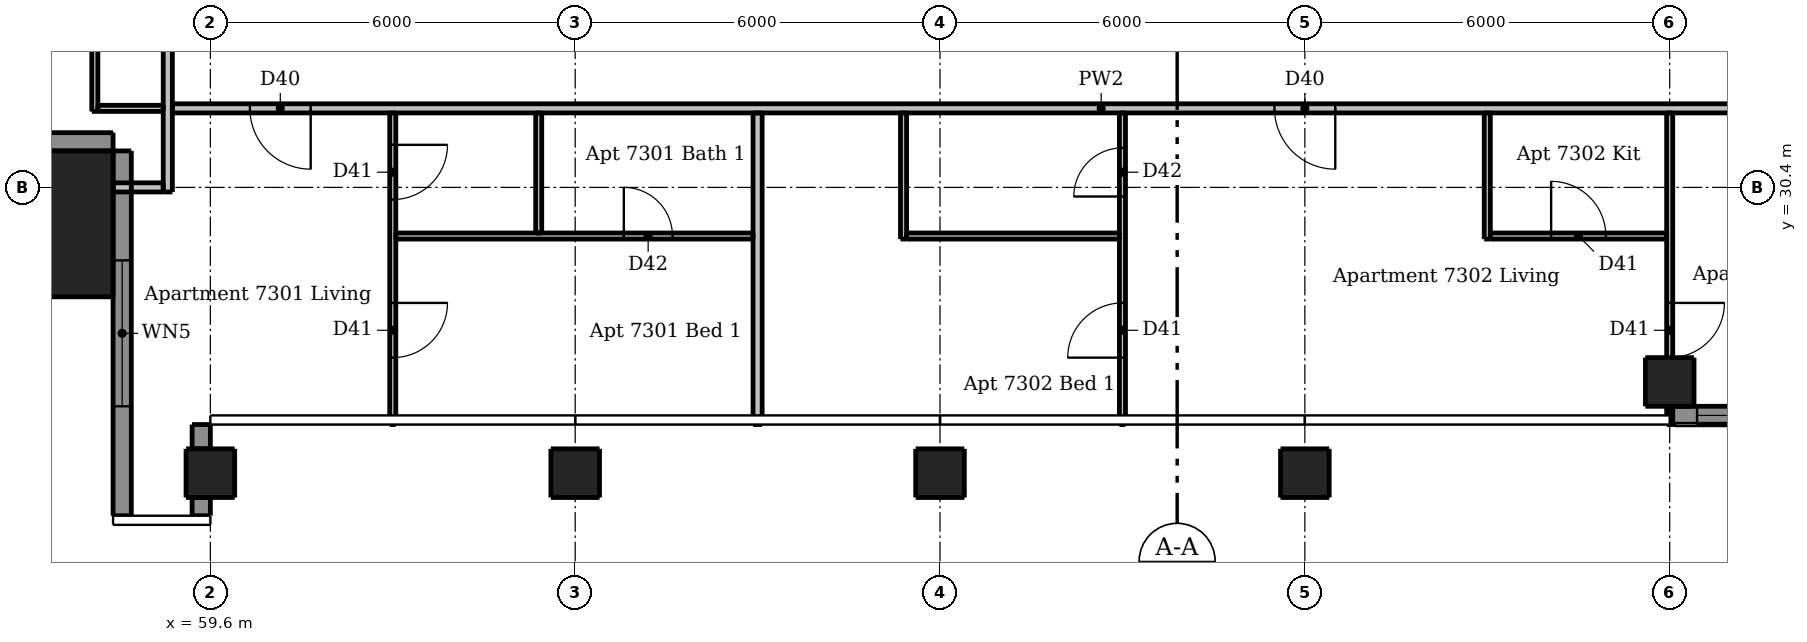
"""IFC4 building model, lengths in metres.
Left out: names, types, materials, properties, quantities, classifications, styles, units other than length and angle.
Written with IfcOpenShell. Run it as: python <this file> out.ifc"""

import sys

from ifc_helpers import new_model, si_unit, direction, frame, frame_2d, origin, origin_2d, place, context, subcontext, project, spatial, rectangle, extrude, element, fill, save


model = new_model("IFC4")
c1 = context("Model", 3, precision=1e-05, world=origin(), true_north=direction((0.0, 1.0)))
c2 = subcontext(c1, "Body", "Model", "MODEL_VIEW")
j1 = project(units=[si_unit("LENGTHUNIT", "METRE"), si_unit("PLANEANGLEUNIT", "RADIAN")], contexts=[c1])
p1 = place(None, origin())
s1 = spatial("IfcSite", under=j1, at=p1, CompositionType="ELEMENT")
p2 = place(p1, origin())
s2 = spatial("IfcBuilding", under=s1, at=p2, CompositionType="ELEMENT")
p3 = place(p2, frame((0.0, 0.0, 271.9)))
s3 = spatial("IfcBuildingStorey", under=s2, at=p3, CompositionType="ELEMENT", Elevation=271.9)
for number, where, z_axis, x_axis in (
    (1, (59.6, 25.7, 0.0), (0.0, 0.0, 1.0), (1.0, 0.0, 0.0)),
    (2, (65.6, 25.7, 0.0), (0.0, 0.0, 1.0), (1.0, 0.0, 0.0)),
    (3, (71.6, 25.7, 0.0), (0.0, 0.0, 1.0), (1.0, 0.0, 0.0)),
    (4, (77.6, 25.7, 0.0), (0.0, 0.0, 1.0), (1.0, 0.0, 0.0)),
    (5, (83.6, 27.2, 0.0), (0.0, 0.0, 1.0), (1.0, 0.0, 0.0)),
):
    element("IfcColumn", number, at=place(p3, frame(where, z_axis=z_axis, x_axis=x_axis)), inside=s3, PredefinedType="COLUMN", context=c2, shape_type="SweptSolid", body=[
        extrude(rectangle(XDim=0.8, YDim=0.8, at=origin_2d()), origin(), (0.0, 0.0, 1.0), 3.05),
    ])
p4 = place(p3, frame((56.8, 29.8, 0.0), z_axis=(0.0, 0.0, 1.0), x_axis=(1.0, 0.0, 0.0)))
e6 = element("IfcColumn", 6, at=p4, inside=s3, PredefinedType="COLUMN", context=c2, shape_type="SweptSolid", body=[
    extrude(rectangle(XDim=2.4, YDim=2.4, at=origin_2d()), origin(), (0.0, 0.0, 1.0), 3.3),
])
p5 = place(p3, frame((59.45, 25.0, 0.0), z_axis=(0.0, 0.0, 1.0), x_axis=(0.0, 1.0, 0.0)))
e7 = element("IfcWall", 7, at=p5, inside=s3, PredefinedType="SOLIDWALL", context=c2, shape_type="SweptSolid", body=[
    extrude(rectangle(XDim=0.3, YDim=0.3, at=frame_2d((0.15, 0.0))), origin(), (0.0, 0.0, 1.0), 3.05),
])
p6 = place(p3, frame((59.45, 26.1, 0.0), z_axis=(0.0, 0.0, 1.0), x_axis=(0.0, 1.0, 0.0)))
e8 = element("IfcWall", 8, at=p6, inside=s3, PredefinedType="SOLIDWALL", context=c2, shape_type="SweptSolid", body=[
    extrude(rectangle(XDim=0.4, YDim=0.3, at=frame_2d((0.2, 0.0))), origin(), (0.0, 0.0, 1.0), 3.05),
])
p7 = place(p3, frame((53.0, 31.15, 0.0), z_axis=(0.0, 0.0, 1.0), x_axis=(1.0, 0.0, 0.0)))
e9 = element("IfcWall", 9, at=p7, inside=s3, PredefinedType="SOLIDWALL", context=c2, shape_type="SweptSolid", body=[
    extrude(rectangle(XDim=5.0, YDim=0.3, at=frame_2d((2.5, 0.0))), origin(), (0.0, 0.0, 1.0), 3.05),
])
p8 = place(p3, frame((58.15, 31.0, 0.0), z_axis=(0.0, 0.0, 1.0), x_axis=(0.0, -1.0, 0.0)))
e10 = element("IfcWall", 10, at=p8, inside=s3, PredefinedType="SOLIDWALL", context=c2, shape_type="SweptSolid", body=[
    extrude(rectangle(XDim=6.0, YDim=0.3, at=frame_2d((3.0, 0.0))), origin(), (0.0, 0.0, 1.0), 3.05),
])
p9 = place(p8, frame((1.8, 0.0, 0.15)))
e11 = element("IfcOpeningElement", 11, at=p9, cuts=e10, PredefinedType="OPENING", context=c2, shape_type="SweptSolid", body=[
    extrude(rectangle(XDim=2.4, YDim=2.1, at=frame_2d((1.2, 1.05))), frame((0.0, 0.16, 0.0), z_axis=(0.0, -1.0, 0.0), x_axis=(1.0, 0.0, 0.0)), (0.0, 0.0, 1.0), 0.32),
])
p10 = place(p3, frame((83.6, 26.65, 0.0), z_axis=(0.0, 0.0, 1.0), x_axis=(1.0, 0.0, 0.0)))
e12 = element("IfcWall", 12, at=p10, inside=s3, PredefinedType="SOLIDWALL", context=c2, shape_type="SweptSolid", body=[
    extrude(rectangle(XDim=5.1, YDim=0.3, at=frame_2d((2.55, 0.0))), origin(), (0.0, 0.0, 1.0), 3.05),
])
p11 = place(p10, frame((0.45, 0.0, 0.15)))
e13 = element("IfcOpeningElement", 13, at=p11, cuts=e12, PredefinedType="OPENING", context=c2, shape_type="SweptSolid", body=[
    extrude(rectangle(XDim=1.8, YDim=2.1, at=frame_2d((0.9, 1.05))), frame((0.0, 0.16, 0.0), z_axis=(0.0, -1.0, 0.0), x_axis=(1.0, 0.0, 0.0)), (0.0, 0.0, 1.0), 0.32),
])
p12 = place(p3, frame((57.7, 31.65, 0.0), z_axis=(0.0, 0.0, 1.0), x_axis=(0.0, 1.0, 0.0)))
e14 = element("IfcWall", 14, at=p12, inside=s3, PredefinedType="PARTITIONING", context=c2, shape_type="SweptSolid", body=[
    extrude(rectangle(XDim=16.675, YDim=0.1, at=frame_2d((8.337, 0.0))), origin(), (0.0, 0.0, 1.0), 3.05),
])
p13 = place(p12, frame((2.55, 0.0, 0.0)))
e15 = element("IfcOpeningElement", 15, at=p13, cuts=e14, PredefinedType="OPENING", context=c2, shape_type="SweptSolid", body=[
    extrude(rectangle(XDim=0.9, YDim=2.1, at=frame_2d((0.45, 1.05))), frame((0.0, 0.06, 0.0), z_axis=(0.0, -1.0, 0.0), x_axis=(1.0, 0.0, 0.0)), (0.0, 0.0, 1.0), 0.12),
])
p14 = place(p12, frame((8.8, 0.0, 0.0)))
e16 = element("IfcOpeningElement", 16, at=p14, cuts=e14, PredefinedType="OPENING", context=c2, shape_type="SweptSolid", body=[
    extrude(rectangle(XDim=0.9, YDim=2.1, at=frame_2d((0.45, 1.05))), frame((0.0, 0.06, 0.0), z_axis=(0.0, -1.0, 0.0), x_axis=(1.0, 0.0, 0.0)), (0.0, 0.0, 1.0), 0.12),
])
p15 = place(p12, frame((6.4, 0.0, 0.0)))
e17 = element("IfcOpeningElement", 17, at=p15, cuts=e14, PredefinedType="OPENING", context=c2, shape_type="SweptSolid", body=[
    extrude(rectangle(XDim=0.9, YDim=2.1, at=frame_2d((0.45, 1.05))), frame((0.0, 0.06, 0.0), z_axis=(0.0, -1.0, 0.0), x_axis=(1.0, 0.0, 0.0)), (0.0, 0.0, 1.0), 0.12),
])
p16 = place(p12, frame((14.5, 0.0, 0.0)))
e18 = element("IfcOpeningElement", 18, at=p16, cuts=e14, PredefinedType="OPENING", context=c2, shape_type="SweptSolid", body=[
    extrude(rectangle(XDim=0.9, YDim=2.1, at=frame_2d((0.45, 1.05))), frame((0.0, 0.06, 0.0), z_axis=(0.0, -1.0, 0.0), x_axis=(1.0, 0.0, 0.0)), (0.0, 0.0, 1.0), 0.12),
])
p17 = place(p12, frame((11.55, 0.0, 0.0)))
e19 = element("IfcOpeningElement", 19, at=p17, cuts=e14, PredefinedType="OPENING", context=c2, shape_type="SweptSolid", body=[
    extrude(rectangle(XDim=0.8, YDim=2.1, at=frame_2d((0.4, 1.05))), frame((0.0, 0.06, 0.0), z_axis=(0.0, -1.0, 0.0), x_axis=(1.0, 0.0, 0.0)), (0.0, 0.0, 1.0), 0.12),
])
p18 = place(p3, frame((62.6, 31.625, 0.0), z_axis=(0.0, 0.0, 1.0), x_axis=(0.0, -1.0, 0.0)))
e20 = element("IfcWall", 20, at=p18, inside=s3, PredefinedType="PARTITIONING", context=c2, shape_type="SweptSolid", body=[
    extrude(rectangle(XDim=5.125, YDim=0.1, at=frame_2d((2.562, 0.0))), origin(), (0.0, 0.0, 1.0), 3.05),
])
p19 = place(p18, frame((0.525, 0.0, 0.0)))
e21 = element("IfcOpeningElement", 21, at=p19, cuts=e20, PredefinedType="OPENING", context=c2, shape_type="SweptSolid", body=[
    extrude(rectangle(XDim=0.9, YDim=2.1, at=frame_2d((0.45, 1.05))), frame((0.0, 0.06, 0.0), z_axis=(0.0, -1.0, 0.0), x_axis=(1.0, 0.0, 0.0)), (0.0, 0.0, 1.0), 0.12),
])
p20 = place(p18, frame((3.125, 0.0, 0.0)))
e22 = element("IfcOpeningElement", 22, at=p20, cuts=e20, PredefinedType="OPENING", context=c2, shape_type="SweptSolid", body=[
    extrude(rectangle(XDim=0.9, YDim=2.1, at=frame_2d((0.45, 1.05))), frame((0.0, 0.06, 0.0), z_axis=(0.0, -1.0, 0.0), x_axis=(1.0, 0.0, 0.0)), (0.0, 0.0, 1.0), 0.12),
])
p21 = place(p3, frame((65.0, 29.65, 0.0), z_axis=(0.0, 0.0, 1.0), x_axis=(0.0, 1.0, 0.0)))
e23 = element("IfcWall", 23, at=p21, inside=s3, PredefinedType="PARTITIONING", context=c2, shape_type="SweptSolid", body=[
    extrude(rectangle(XDim=1.975, YDim=0.1, at=frame_2d((0.988, 0.0))), origin(), (0.0, 0.0, 1.0), 3.05),
])
p22 = place(p3, frame((71.0, 29.55, 0.0), z_axis=(0.0, 0.0, 1.0), x_axis=(0.0, 1.0, 0.0)))
e24 = element("IfcWall", 24, at=p22, inside=s3, PredefinedType="PARTITIONING", context=c2, shape_type="SweptSolid", body=[
    extrude(rectangle(XDim=2.075, YDim=0.1, at=frame_2d((1.038, 0.0))), origin(), (0.0, 0.0, 1.0), 3.05),
])
p23 = place(p3, frame((74.6, 26.5, 0.0), z_axis=(0.0, 0.0, 1.0), x_axis=(0.0, 1.0, 0.0)))
e25 = element("IfcWall", 25, at=p23, inside=s3, PredefinedType="PARTITIONING", context=c2, shape_type="SweptSolid", body=[
    extrude(rectangle(XDim=5.125, YDim=0.1, at=frame_2d((2.562, 0.0))), origin(), (0.0, 0.0, 1.0), 3.05),
])
p24 = place(p23, frame((1.1, 0.0, 0.0)))
e26 = element("IfcOpeningElement", 26, at=p24, cuts=e25, PredefinedType="OPENING", context=c2, shape_type="SweptSolid", body=[
    extrude(rectangle(XDim=0.9, YDim=2.1, at=frame_2d((0.45, 1.05))), frame((0.0, 0.06, 0.0), z_axis=(0.0, -1.0, 0.0), x_axis=(1.0, 0.0, 0.0)), (0.0, 0.0, 1.0), 0.12),
])
p25 = place(p23, frame((3.75, 0.0, 0.0)))
e27 = element("IfcOpeningElement", 27, at=p25, cuts=e25, PredefinedType="OPENING", context=c2, shape_type="SweptSolid", body=[
    extrude(rectangle(XDim=0.8, YDim=2.1, at=frame_2d((0.4, 1.05))), frame((0.0, 0.06, 0.0), z_axis=(0.0, -1.0, 0.0), x_axis=(1.0, 0.0, 0.0)), (0.0, 0.0, 1.0), 0.12),
])
p26 = place(p3, frame((80.6, 29.55, 0.0), z_axis=(0.0, 0.0, 1.0), x_axis=(0.0, 1.0, 0.0)))
e28 = element("IfcWall", 28, at=p26, inside=s3, PredefinedType="PARTITIONING", context=c2, shape_type="SweptSolid", body=[
    extrude(rectangle(XDim=2.075, YDim=0.1, at=frame_2d((1.038, 0.0))), origin(), (0.0, 0.0, 1.0), 3.05),
])
p27 = place(p3, frame((83.6, 31.625, 0.0), z_axis=(0.0, 0.0, 1.0), x_axis=(0.0, -1.0, 0.0)))
e29 = element("IfcWall", 29, at=p27, inside=s3, PredefinedType="PARTITIONING", context=c2, shape_type="SweptSolid", body=[
    extrude(rectangle(XDim=5.125, YDim=0.1, at=frame_2d((2.562, 0.0))), origin(), (0.0, 0.0, 1.0), 2.647),
])
p28 = place(p27, frame((3.125, 0.0, 0.0)))
e30 = element("IfcOpeningElement", 30, at=p28, cuts=e29, PredefinedType="OPENING", context=c2, shape_type="SweptSolid", body=[
    extrude(rectangle(XDim=0.9, YDim=2.1, at=frame_2d((0.45, 1.05))), frame((0.0, 0.06, 0.0), z_axis=(0.0, -1.0, 0.0), x_axis=(1.0, 0.0, 0.0)), (0.0, 0.0, 1.0), 0.12),
])
p29 = place(p3, frame((57.75, 31.7, 0.0), z_axis=(0.0, 0.0, 1.0), x_axis=(1.0, 0.0, 0.0)))
e31 = element("IfcWall", 31, at=p29, inside=s3, PredefinedType="PARTITIONING", context=c2, shape_type="SweptSolid", body=[
    extrude(rectangle(XDim=1.075, YDim=0.1, at=frame_2d((0.538, 0.0))), origin(), (0.0, 0.0, 1.0), 3.05),
])
p30 = place(p3, frame((62.65, 29.6, 0.0), z_axis=(0.0, 0.0, 1.0), x_axis=(1.0, 0.0, 0.0)))
e32 = element("IfcWall", 32, at=p30, inside=s3, PredefinedType="PARTITIONING", context=c2, shape_type="SweptSolid", body=[
    extrude(rectangle(XDim=5.875, YDim=0.1, at=frame_2d((2.938, 0.0))), origin(), (0.0, 0.0, 1.0), 3.05),
])
p31 = place(p30, frame((3.75, 0.0, 0.0)))
e33 = element("IfcOpeningElement", 33, at=p31, cuts=e32, PredefinedType="OPENING", context=c2, shape_type="SweptSolid", body=[
    extrude(rectangle(XDim=0.8, YDim=2.1, at=frame_2d((0.4, 1.05))), frame((0.0, 0.06, 0.0), z_axis=(0.0, -1.0, 0.0), x_axis=(1.0, 0.0, 0.0)), (0.0, 0.0, 1.0), 0.12),
])
p32 = place(p3, frame((71.05, 29.6, 0.0), z_axis=(0.0, 0.0, 1.0), x_axis=(1.0, 0.0, 0.0)))
e34 = element("IfcWall", 34, at=p32, inside=s3, PredefinedType="PARTITIONING", context=c2, shape_type="SweptSolid", body=[
    extrude(rectangle(XDim=3.5, YDim=0.1, at=frame_2d((1.75, 0.0))), origin(), (0.0, 0.0, 1.0), 3.05),
])
p33 = place(p3, frame((80.65, 29.6, 0.0), z_axis=(0.0, 0.0, 1.0), x_axis=(1.0, 0.0, 0.0)))
e35 = element("IfcWall", 35, at=p33, inside=s3, PredefinedType="PARTITIONING", context=c2, shape_type="SweptSolid", body=[
    extrude(rectangle(XDim=2.9, YDim=0.1, at=frame_2d((1.45, 0.0))), origin(), (0.0, 0.0, 1.0), 3.05),
])
p34 = place(p33, frame((1.0, 0.0, 0.0)))
e36 = element("IfcOpeningElement", 36, at=p34, cuts=e35, PredefinedType="OPENING", context=c2, shape_type="SweptSolid", body=[
    extrude(rectangle(XDim=0.9, YDim=2.1, at=frame_2d((0.45, 1.05))), frame((0.0, 0.06, 0.0), z_axis=(0.0, -1.0, 0.0), x_axis=(1.0, 0.0, 0.0)), (0.0, 0.0, 1.0), 0.12),
])
p35 = place(p3, frame((58.9, 30.325, 0.0), z_axis=(0.0, 0.0, 1.0), x_axis=(0.0, 1.0, 0.0)))
e37 = element("IfcWall", 37, at=p35, inside=s3, PredefinedType="PARTITIONING", context=c2, shape_type="SweptSolid", body=[
    extrude(rectangle(XDim=30.85, YDim=0.15, at=frame_2d((15.425, 0.0))), origin(), (0.0, 0.0, 1.0), 3.05),
])
p36 = place(p35, frame((9.225, 0.0, 0.0)))
e38 = element("IfcOpeningElement", 38, at=p36, cuts=e37, PredefinedType="OPENING", context=c2, shape_type="SweptSolid", body=[
    extrude(rectangle(XDim=1.0, YDim=2.1, at=frame_2d((0.5, 1.05))), frame((0.0, 0.085, 0.0), z_axis=(0.0, -1.0, 0.0), x_axis=(1.0, 0.0, 0.0)), (0.0, 0.0, 1.0), 0.17),
])
p37 = place(p35, frame((26.925, 0.0, 0.0)))
e39 = element("IfcOpeningElement", 39, at=p37, cuts=e37, PredefinedType="OPENING", context=c2, shape_type="SweptSolid", body=[
    extrude(rectangle(XDim=1.0, YDim=2.1, at=frame_2d((0.5, 1.05))), frame((0.0, 0.085, 0.0), z_axis=(0.0, -1.0, 0.0), x_axis=(1.0, 0.0, 0.0)), (0.0, 0.0, 1.0), 0.17),
])
p38 = place(p3, frame((68.6, 26.5, 0.0), z_axis=(0.0, 0.0, 1.0), x_axis=(0.0, 1.0, 0.0)))
e40 = element("IfcWall", 40, at=p38, inside=s3, PredefinedType="PARTITIONING", context=c2, shape_type="SweptSolid", body=[
    extrude(rectangle(XDim=5.125, YDim=0.15, at=frame_2d((2.562, 0.0))), origin(), (0.0, 0.0, 1.0), 3.05),
])
p39 = place(p3, frame((89.525, 31.7, 0.0), z_axis=(0.0, 0.0, 1.0), x_axis=(-1.0, 0.0, 0.0)))
e41 = element("IfcWall", 41, at=p39, inside=s3, PredefinedType="PARTITIONING", context=c2, shape_type="SweptSolid", body=[
    extrude(rectangle(XDim=30.55, YDim=0.15, at=frame_2d((15.275, 0.0))), origin(), (0.0, 0.0, 1.0), 3.05),
])
p40 = place(p39, frame((28.275, 0.0, 0.0)))
e42 = element("IfcOpeningElement", 42, at=p40, cuts=e41, PredefinedType="OPENING", context=c2, shape_type="SweptSolid", body=[
    extrude(rectangle(XDim=1.0, YDim=2.1, at=frame_2d((0.5, 1.05))), frame((0.0, 0.085, 0.0), z_axis=(0.0, -1.0, 0.0), x_axis=(1.0, 0.0, 0.0)), (0.0, 0.0, 1.0), 0.17),
])
p41 = place(p39, frame((11.425, 0.0, 0.0)))
e43 = element("IfcOpeningElement", 43, at=p41, cuts=e41, PredefinedType="OPENING", context=c2, shape_type="SweptSolid", body=[
    extrude(rectangle(XDim=1.0, YDim=2.1, at=frame_2d((0.5, 1.05))), frame((0.0, 0.085, 0.0), z_axis=(0.0, -1.0, 0.0), x_axis=(1.0, 0.0, 0.0)), (0.0, 0.0, 1.0), 0.17),
])
p42 = place(p3, frame((58.0, 30.4, 0.0), z_axis=(0.0, 0.0, 1.0), x_axis=(1.0, 0.0, 0.0)))
e44 = element("IfcWall", 44, at=p42, inside=s3, PredefinedType="PARTITIONING", context=c2, shape_type="SweptSolid", body=[
    extrude(rectangle(XDim=0.825, YDim=0.15, at=frame_2d((0.413, 0.0))), origin(), (0.0, 0.0, 1.0), 3.05),
])
p43 = place(p9, origin())
e45 = element("IfcWindow", 45, at=p43, inside=s3, PartitioningType="DOUBLE_PANEL_VERTICAL", PredefinedType="WINDOW", context=c2, shape_type="SweptSolid", body=[
    extrude(rectangle(XDim=2.4, YDim=2.1, at=frame_2d((1.2, 1.05))), frame((0.0, 0.03, 0.0), z_axis=(0.0, -1.0, 0.0), x_axis=(1.0, 0.0, 0.0)), (0.0, 0.0, 1.0), 0.06),
])
fill(e11, e45)
p44 = place(p11, origin())
e46 = element("IfcWindow", 46, at=p44, inside=s3, PartitioningType="DOUBLE_PANEL_VERTICAL", PredefinedType="WINDOW", context=c2, shape_type="SweptSolid", body=[
    extrude(rectangle(XDim=1.8, YDim=2.1, at=frame_2d((0.9, 1.05))), frame((0.0, 0.03, 0.0), z_axis=(0.0, -1.0, 0.0), x_axis=(1.0, 0.0, 0.0)), (0.0, 0.0, 1.0), 0.06),
])
fill(e13, e46)
p45 = place(p40, origin())
e47 = element("IfcDoor", 47, at=p45, inside=s3, OperationType="SINGLE_SWING_LEFT", PredefinedType="DOOR", context=c2, shape_type="SweptSolid", body=[
    extrude(rectangle(XDim=1.0, YDim=2.1, at=frame_2d((0.5, 1.05))), frame((0.0, 0.025, 0.0), z_axis=(0.0, -1.0, 0.0), x_axis=(1.0, 0.0, 0.0)), (0.0, 0.0, 1.0), 0.05),
])
fill(e42, e47)
p46 = place(p19, origin())
e48 = element("IfcDoor", 48, at=p46, inside=s3, OperationType="SINGLE_SWING_LEFT", PredefinedType="DOOR", context=c2, shape_type="SweptSolid", body=[
    extrude(rectangle(XDim=0.9, YDim=2.1, at=frame_2d((0.45, 1.05))), frame((0.0, 0.025, 0.0), z_axis=(0.0, -1.0, 0.0), x_axis=(1.0, 0.0, 0.0)), (0.0, 0.0, 1.0), 0.05),
])
fill(e21, e48)
p47 = place(p20, origin())
e49 = element("IfcDoor", 49, at=p47, inside=s3, OperationType="SINGLE_SWING_LEFT", PredefinedType="DOOR", context=c2, shape_type="SweptSolid", body=[
    extrude(rectangle(XDim=0.9, YDim=2.1, at=frame_2d((0.45, 1.05))), frame((0.0, 0.025, 0.0), z_axis=(0.0, -1.0, 0.0), x_axis=(1.0, 0.0, 0.0)), (0.0, 0.0, 1.0), 0.05),
])
fill(e22, e49)
p48 = place(p31, origin())
e50 = element("IfcDoor", 50, at=p48, inside=s3, OperationType="SINGLE_SWING_LEFT", PredefinedType="DOOR", context=c2, shape_type="SweptSolid", body=[
    extrude(rectangle(XDim=0.8, YDim=2.1, at=frame_2d((0.4, 1.05))), frame((0.0, 0.025, 0.0), z_axis=(0.0, -1.0, 0.0), x_axis=(1.0, 0.0, 0.0)), (0.0, 0.0, 1.0), 0.05),
])
fill(e33, e50)
p49 = place(p41, origin())
e51 = element("IfcDoor", 51, at=p49, inside=s3, OperationType="SINGLE_SWING_LEFT", PredefinedType="DOOR", context=c2, shape_type="SweptSolid", body=[
    extrude(rectangle(XDim=1.0, YDim=2.1, at=frame_2d((0.5, 1.05))), frame((0.0, 0.025, 0.0), z_axis=(0.0, -1.0, 0.0), x_axis=(1.0, 0.0, 0.0)), (0.0, 0.0, 1.0), 0.05),
])
fill(e43, e51)
p50 = place(p34, origin())
e52 = element("IfcDoor", 52, at=p50, inside=s3, OperationType="SINGLE_SWING_LEFT", PredefinedType="DOOR", context=c2, shape_type="SweptSolid", body=[
    extrude(rectangle(XDim=0.9, YDim=2.1, at=frame_2d((0.45, 1.05))), frame((0.0, 0.025, 0.0), z_axis=(0.0, -1.0, 0.0), x_axis=(1.0, 0.0, 0.0)), (0.0, 0.0, 1.0), 0.05),
])
fill(e36, e52)
p51 = place(p24, origin())
e53 = element("IfcDoor", 53, at=p51, inside=s3, OperationType="SINGLE_SWING_LEFT", PredefinedType="DOOR", context=c2, shape_type="SweptSolid", body=[
    extrude(rectangle(XDim=0.9, YDim=2.1, at=frame_2d((0.45, 1.05))), frame((0.0, 0.025, 0.0), z_axis=(0.0, -1.0, 0.0), x_axis=(1.0, 0.0, 0.0)), (0.0, 0.0, 1.0), 0.05),
])
fill(e26, e53)
p52 = place(p25, origin())
e54 = element("IfcDoor", 54, at=p52, inside=s3, OperationType="SINGLE_SWING_LEFT", PredefinedType="DOOR", context=c2, shape_type="SweptSolid", body=[
    extrude(rectangle(XDim=0.8, YDim=2.1, at=frame_2d((0.4, 1.05))), frame((0.0, 0.025, 0.0), z_axis=(0.0, -1.0, 0.0), x_axis=(1.0, 0.0, 0.0)), (0.0, 0.0, 1.0), 0.05),
])
fill(e27, e54)
p53 = place(p28, origin())
e55 = element("IfcDoor", 55, at=p53, inside=s3, OperationType="SINGLE_SWING_LEFT", PredefinedType="DOOR", context=c2, shape_type="SweptSolid", body=[
    extrude(rectangle(XDim=0.9, YDim=2.1, at=frame_2d((0.45, 1.05))), frame((0.0, 0.025, 0.0), z_axis=(0.0, -1.0, 0.0), x_axis=(1.0, 0.0, 0.0)), (0.0, 0.0, 1.0), 0.05),
])
fill(e30, e55)
save(model, sys.argv[1])
